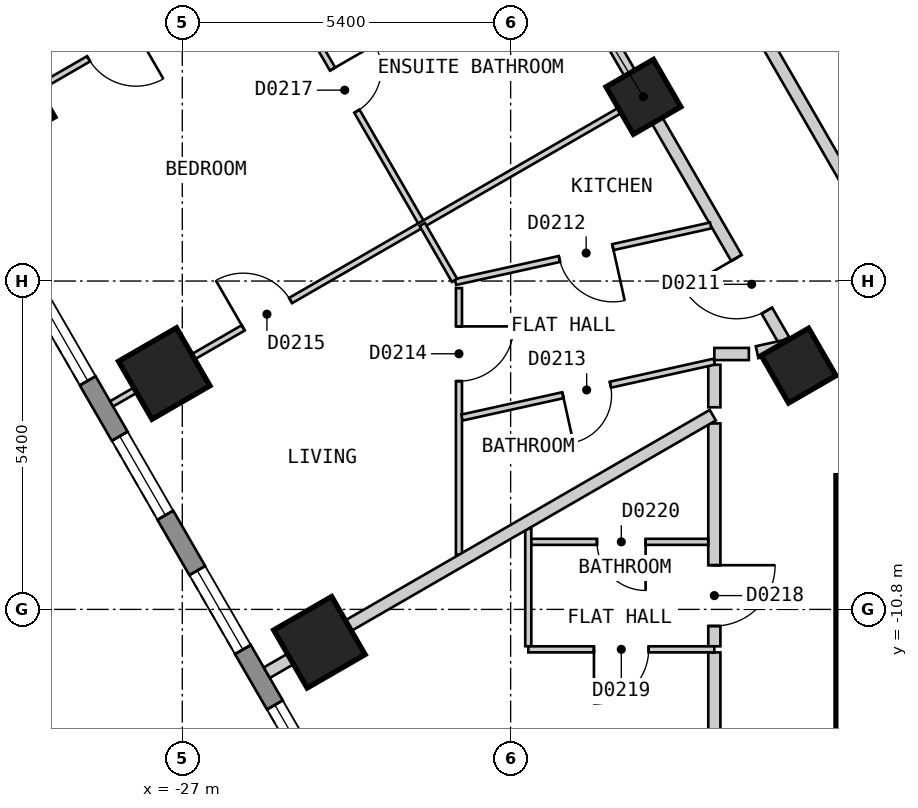
"""IFC4 building model, lengths in metres.
Left out: names, types, materials, properties, quantities, classifications, styles, units other than length and angle.
Written with IfcOpenShell. Run it as: python <this file> out.ifc"""

import sys

from ifc_helpers import new_model, si_unit, direction, frame, frame_2d, origin, origin_2d, place, context, subcontext, project, spatial, polyline, rectangle, outline, extrude, element, fill, save


model = new_model("IFC4")
c1 = context("Model", 3, precision=1e-05, world=origin(), true_north=direction((0.0, 1.0)))
c2 = subcontext(c1, "Body", "Model", "MODEL_VIEW")
j1 = project(units=[si_unit("LENGTHUNIT", "METRE"), si_unit("PLANEANGLEUNIT", "RADIAN")], contexts=[c1])
p1 = place(None, origin())
s1 = spatial("IfcSite", under=j1, at=p1, CompositionType="ELEMENT")
p2 = place(p1, origin())
s2 = spatial("IfcBuilding", under=s1, at=p2, CompositionType="ELEMENT")
p3 = place(p2, frame((0.0, 0.0, 47.4)))
s3 = spatial("IfcBuildingStorey", under=s2, at=p3, CompositionType="ELEMENT", Elevation=47.4)
for number, where, z_axis, x_axis in (
    (1, (-29.848, -2.5, 0.0), (0.0, 0.0, 1.0), (0.5, -0.866, 0.0)),
    (2, (-27.297, -6.921, 0.0), (0.0, 0.0, 1.0), (0.5, -0.866, 0.0)),
    (3, (-24.745, -11.341, 0.0), (0.0, 0.0, 1.0), (0.5, -0.866, 0.0)),
):
    element("IfcColumn", number, at=place(p3, frame(where, z_axis=z_axis, x_axis=x_axis)), inside=s3, PredefinedType="COLUMN", context=c2, shape_type="SweptSolid", body=[
        extrude(rectangle(XDim=1.1, YDim=1.1, at=origin_2d()), origin(), (0.0, 0.0, 1.0), 3.0),
    ])
for number, where, z_axis, x_axis in (
    (4, (-19.416, -2.371, 0.0), (0.0, 0.0, 1.0), (0.5, -0.866, 0.0)),
    (5, (-16.864, -6.791, 0.0), (0.0, 0.0, 1.0), (0.5, -0.866, 0.0)),
):
    element("IfcColumn", number, at=place(p3, frame(where, z_axis=z_axis, x_axis=x_axis)), inside=s3, PredefinedType="COLUMN", context=c2, shape_type="SweptSolid", body=[
        extrude(rectangle(XDim=0.9, YDim=0.9, at=origin_2d()), origin(), (0.0, 0.0, 1.0), 3.0),
    ])
p4 = place(p3, frame((-31.22, -2.425, 0.0), z_axis=(0.0, 0.0, 1.0), x_axis=(0.500001938803, -0.866024284413, 0.0)))
e6 = element("IfcWall", 6, at=p4, inside=s3, PredefinedType="SOLIDWALL", context=c2, shape_type="SweptSolid", body=[
    extrude(outline(polyline([(0.0, -0.15), (27.02, -0.15), (26.94, 0.15), (0.08, 0.15), (0.0, -0.15)])), origin(), (0.0, 0.0, 1.0), 2.7),
])
p5 = place(p4, frame((1.277, 0.0, 0.15)))
e7 = element("IfcOpeningElement", 7, at=p5, cuts=e6, PredefinedType="OPENING", context=c2, shape_type="SweptSolid", body=[
    extrude(rectangle(XDim=1.5, YDim=2.1, at=frame_2d((0.75, 1.05))), frame((0.0, 0.16, 0.0), z_axis=(0.0, -1.0, 0.0), x_axis=(1.0, 0.0, 0.0)), (0.0, 0.0, 1.0), 0.32),
])
p6 = place(p4, frame((3.829, 0.0, 0.15)))
e8 = element("IfcOpeningElement", 8, at=p6, cuts=e6, PredefinedType="OPENING", context=c2, shape_type="SweptSolid", body=[
    extrude(rectangle(XDim=1.5, YDim=2.1, at=frame_2d((0.75, 1.05))), frame((0.0, 0.16, 0.0), z_axis=(0.0, -1.0, 0.0), x_axis=(1.0, 0.0, 0.0)), (0.0, 0.0, 1.0), 0.32),
])
p7 = place(p4, frame((6.382, 0.0, 0.15)))
e9 = element("IfcOpeningElement", 9, at=p7, cuts=e6, PredefinedType="OPENING", context=c2, shape_type="SweptSolid", body=[
    extrude(rectangle(XDim=1.5, YDim=2.1, at=frame_2d((0.75, 1.05))), frame((0.0, 0.16, 0.0), z_axis=(0.0, -1.0, 0.0), x_axis=(1.0, 0.0, 0.0)), (0.0, 0.0, 1.0), 0.32),
])
p8 = place(p4, frame((8.933, 0.0, 0.15)))
e10 = element("IfcOpeningElement", 10, at=p8, cuts=e6, PredefinedType="OPENING", context=c2, shape_type="SweptSolid", body=[
    extrude(rectangle(XDim=1.5, YDim=2.1, at=frame_2d((0.75, 1.05))), frame((0.0, 0.16, 0.0), z_axis=(0.0, -1.0, 0.0), x_axis=(1.0, 0.0, 0.0)), (0.0, 0.0, 1.0), 0.32),
])
p9 = place(p4, frame((11.485, 0.0, 0.15)))
e11 = element("IfcOpeningElement", 11, at=p9, cuts=e6, PredefinedType="OPENING", context=c2, shape_type="SweptSolid", body=[
    extrude(rectangle(XDim=1.5, YDim=2.1, at=frame_2d((0.75, 1.05))), frame((0.0, 0.16, 0.0), z_axis=(0.0, -1.0, 0.0), x_axis=(1.0, 0.0, 0.0)), (0.0, 0.0, 1.0), 0.32),
])
p10 = place(p4, frame((14.037, 0.0, 0.15)))
e12 = element("IfcOpeningElement", 12, at=p10, cuts=e6, PredefinedType="OPENING", context=c2, shape_type="SweptSolid", body=[
    extrude(rectangle(XDim=1.5, YDim=2.1, at=frame_2d((0.75, 1.05))), frame((0.0, 0.16, 0.0), z_axis=(0.0, -1.0, 0.0), x_axis=(1.0, 0.0, 0.0)), (0.0, 0.0, 1.0), 0.32),
])
p11 = place(p4, frame((16.589, 0.0, 0.15)))
e13 = element("IfcOpeningElement", 13, at=p11, cuts=e6, PredefinedType="OPENING", context=c2, shape_type="SweptSolid", body=[
    extrude(rectangle(XDim=1.5, YDim=2.1, at=frame_2d((0.75, 1.05))), frame((0.0, 0.16, 0.0), z_axis=(0.0, -1.0, 0.0), x_axis=(1.0, 0.0, 0.0)), (0.0, 0.0, 1.0), 0.32),
])
p12 = place(p4, frame((19.141, 0.0, 0.15)))
e14 = element("IfcOpeningElement", 14, at=p12, cuts=e6, PredefinedType="OPENING", context=c2, shape_type="SweptSolid", body=[
    extrude(rectangle(XDim=1.5, YDim=2.1, at=frame_2d((0.75, 1.05))), frame((0.0, 0.16, 0.0), z_axis=(0.0, -1.0, 0.0), x_axis=(1.0, 0.0, 0.0)), (0.0, 0.0, 1.0), 0.32),
])
p13 = place(p4, frame((21.693, 0.0, 0.15)))
e15 = element("IfcOpeningElement", 15, at=p13, cuts=e6, PredefinedType="OPENING", context=c2, shape_type="SweptSolid", body=[
    extrude(rectangle(XDim=1.5, YDim=2.1, at=frame_2d((0.75, 1.05))), frame((0.0, 0.16, 0.0), z_axis=(0.0, -1.0, 0.0), x_axis=(1.0, 0.0, 0.0)), (0.0, 0.0, 1.0), 0.32),
])
p14 = place(p4, frame((24.244, 0.0, 0.15)))
e16 = element("IfcOpeningElement", 16, at=p14, cuts=e6, PredefinedType="OPENING", context=c2, shape_type="SweptSolid", body=[
    extrude(rectangle(XDim=1.5, YDim=2.1, at=frame_2d((0.75, 1.05))), frame((0.0, 0.16, 0.0), z_axis=(0.0, -1.0, 0.0), x_axis=(1.0, 0.0, 0.0)), (0.0, 0.0, 1.0), 0.32),
])
p15 = place(p3, frame((-18.186, -0.101, 0.0), z_axis=(0.0, 0.0, 1.0), x_axis=(0.499997591167, -0.86602679452, 0.0)))
e17 = element("IfcWall", 17, at=p15, inside=s3, PredefinedType="PARTITIONING", context=c2, shape_type="SweptSolid", body=[
    extrude(rectangle(XDim=5.172, YDim=0.2, at=frame_2d((2.586, 0.0))), origin(), (0.0, 0.0, 1.0), 2.7),
])
p16 = place(p3, frame((-20.727, -0.101, 0.0), z_axis=(0.0, 0.0, 1.0), x_axis=(0.500070814966, -0.865984514884, 0.0)))
e18 = element("IfcWall", 18, at=p16, inside=s3, PredefinedType="PARTITIONING", context=c2, shape_type="SweptSolid", body=[
    extrude(rectangle(XDim=7.239, YDim=0.2, at=frame_2d((3.62, 0.0))), origin(), (0.0, 0.0, 1.0), 2.7),
])
p17 = place(p16, frame((5.681, 0.0, 0.0)))
e19 = element("IfcOpeningElement", 19, at=p17, cuts=e18, PredefinedType="OPENING", context=c2, shape_type="SweptSolid", body=[
    extrude(rectangle(XDim=1.0, YDim=2.1, at=frame_2d((0.5, 1.05))), frame((0.0, 0.11, 0.0), z_axis=(0.0, -1.0, 0.0), x_axis=(1.0, 0.0, 0.0)), (0.0, 0.0, 1.0), 0.22),
])
p18 = place(p3, frame((-18.25, -11.507, 0.0), z_axis=(0.0, 0.0, 1.0), x_axis=(0.0, -1.0, 0.0)))
e20 = element("IfcWall", 20, at=p18, inside=s3, PredefinedType="PARTITIONING", context=c2, shape_type="SweptSolid", body=[
    extrude(rectangle(XDim=4.792, YDim=0.2, at=frame_2d((2.396, 0.0))), origin(), (0.0, 0.0, 1.0), 2.7),
])
p19 = place(p3, frame((-18.25, -6.6, 0.0), z_axis=(0.0, 0.0, 1.0), x_axis=(1.0, 0.0, 0.0)))
e21 = element("IfcWall", 21, at=p19, inside=s3, PredefinedType="PARTITIONING", context=c2, shape_type="SweptSolid", body=[
    extrude(rectangle(XDim=0.568, YDim=0.2, at=frame_2d((0.284, 0.0))), origin(), (0.0, 0.0, 1.0), 2.7),
])
p20 = place(p3, frame((-18.25, -11.407, 0.0), z_axis=(0.0, 0.0, 1.0), x_axis=(0.0, 1.0, 0.0)))
e22 = element("IfcWall", 22, at=p20, inside=s3, PredefinedType="PARTITIONING", context=c2, shape_type="SweptSolid", body=[
    extrude(rectangle(XDim=3.665, YDim=0.2, at=frame_2d((1.833, 0.0))), origin(), (0.0, 0.0, 1.0), 2.7),
])
p21 = place(p20, frame((0.334, 0.0, 0.0)))
e23 = element("IfcOpeningElement", 23, at=p21, cuts=e22, PredefinedType="OPENING", context=c2, shape_type="SweptSolid", body=[
    extrude(rectangle(XDim=1.0, YDim=2.1, at=frame_2d((0.5, 1.05))), frame((0.0, 0.11, 0.0), z_axis=(0.0, -1.0, 0.0), x_axis=(1.0, 0.0, 0.0)), (0.0, 0.0, 1.0), 0.22),
])
p22 = place(p3, frame((-18.25, -7.476, 0.0), z_axis=(0.0, 0.0, 1.0), x_axis=(0.0, 1.0, 0.0)))
e24 = element("IfcWall", 24, at=p22, inside=s3, PredefinedType="PARTITIONING", context=c2, shape_type="SweptSolid", body=[
    extrude(rectangle(XDim=0.699, YDim=0.2, at=frame_2d((0.35, 0.0))), origin(), (0.0, 0.0, 1.0), 2.7),
])
p23 = place(p3, frame((-25.58, -0.094, 0.0), z_axis=(0.0, 0.0, 1.0), x_axis=(0.500093258202, -0.865971554441, 0.0)))
e25 = element("IfcWall", 25, at=p23, inside=s3, PredefinedType="PARTITIONING", context=c2, shape_type="SweptSolid", body=[
    extrude(rectangle(XDim=5.053, YDim=0.1, at=frame_2d((2.527, 0.0))), origin(), (0.0, 0.0, 1.0), 2.7),
])
p24 = place(p23, frame((2.102, 0.0, 0.0)))
e26 = element("IfcOpeningElement", 26, at=p24, cuts=e25, PredefinedType="OPENING", context=c2, shape_type="SweptSolid", body=[
    extrude(rectangle(XDim=0.8, YDim=2.1, at=frame_2d((0.4, 1.05))), frame((0.0, 0.06, 0.0), z_axis=(0.0, -1.0, 0.0), x_axis=(1.0, 0.0, 0.0)), (0.0, 0.0, 1.0), 0.12),
])
p25 = place(p3, frame((-21.31, -9.474, 0.0), z_axis=(0.0, 0.0, 1.0), x_axis=(0.0, -1.0, 0.0)))
e27 = element("IfcWall", 27, at=p25, inside=s3, PredefinedType="PARTITIONING", context=c2, shape_type="SweptSolid", body=[
    extrude(rectangle(XDim=1.932, YDim=0.1, at=frame_2d((0.966, 0.0))), origin(), (0.0, 0.0, 1.0), 2.7),
])
p26 = place(p3, frame((-21.26, -9.689, 0.0), z_axis=(0.0, 0.0, 1.0), x_axis=(1.0, 0.0, 0.0)))
e28 = element("IfcWall", 28, at=p26, inside=s3, PredefinedType="PARTITIONING", context=c2, shape_type="SweptSolid", body=[
    extrude(rectangle(XDim=2.91, YDim=0.1, at=frame_2d((1.455, 0.0))), origin(), (0.0, 0.0, 1.0), 2.7),
])
p27 = place(p26, frame((1.08, 0.0, 0.0)))
e29 = element("IfcOpeningElement", 29, at=p27, cuts=e28, PredefinedType="OPENING", context=c2, shape_type="SweptSolid", body=[
    extrude(rectangle(XDim=0.8, YDim=2.1, at=frame_2d((0.4, 1.05))), frame((0.0, 0.06, 0.0), z_axis=(0.0, -1.0, 0.0), x_axis=(1.0, 0.0, 0.0)), (0.0, 0.0, 1.0), 0.12),
])
p28 = place(p3, frame((-21.309, -11.457, 0.0), z_axis=(0.0, 0.0, 1.0), x_axis=(1.0, 0.0, 0.0)))
e30 = element("IfcWall", 30, at=p28, inside=s3, PredefinedType="PARTITIONING", context=c2, shape_type="SweptSolid", body=[
    extrude(rectangle(XDim=3.059, YDim=0.1, at=frame_2d((1.53, 0.0))), origin(), (0.0, 0.0, 1.0), 2.7),
])
p29 = place(p28, frame((1.079, 0.0, 0.0)))
e31 = element("IfcOpeningElement", 31, at=p29, cuts=e30, PredefinedType="OPENING", context=c2, shape_type="SweptSolid", body=[
    extrude(rectangle(XDim=0.9, YDim=2.1, at=frame_2d((0.45, 1.05))), frame((0.0, 0.06, 0.0), z_axis=(0.0, -1.0, 0.0), x_axis=(1.0, 0.0, 0.0)), (0.0, 0.0, 1.0), 0.12),
])
p30 = place(p3, frame((-22.45, -9.901, 0.0), z_axis=(0.0, 0.0, 1.0), x_axis=(0.0, 1.0, 0.0)))
e32 = element("IfcWall", 32, at=p30, inside=s3, PredefinedType="PARTITIONING", context=c2, shape_type="SweptSolid", body=[
    extrude(rectangle(XDim=4.385, YDim=0.1, at=frame_2d((2.192, 0.0))), origin(), (0.0, 0.0, 1.0), 2.7),
])
p31 = place(p30, frame((2.855, 0.0, 0.0)))
e33 = element("IfcOpeningElement", 33, at=p31, cuts=e32, PredefinedType="OPENING", context=c2, shape_type="SweptSolid", body=[
    extrude(rectangle(XDim=0.9, YDim=2.1, at=frame_2d((0.45, 1.05))), frame((0.0, 0.06, 0.0), z_axis=(0.0, -1.0, 0.0), x_axis=(1.0, 0.0, 0.0)), (0.0, 0.0, 1.0), 0.12),
])
p32 = place(p3, frame((-22.508, -5.416, 0.0), z_axis=(0.0, 0.0, 1.0), x_axis=(0.976332464286, 0.216275100696, 0.0)))
e34 = element("IfcWall", 34, at=p32, inside=s3, PredefinedType="PARTITIONING", context=c2, shape_type="SweptSolid", body=[
    extrude(rectangle(XDim=4.3, YDim=0.1, at=frame_2d((2.15, 0.0))), origin(), (0.0, 0.0, 1.0), 2.7),
])
p33 = place(p32, frame((1.752, 0.0, 0.0)))
e35 = element("IfcOpeningElement", 35, at=p33, cuts=e34, PredefinedType="OPENING", context=c2, shape_type="SweptSolid", body=[
    extrude(rectangle(XDim=0.9, YDim=2.1, at=frame_2d((0.45, 1.05))), frame((0.0, 0.06, 0.0), z_axis=(0.0, -1.0, 0.0), x_axis=(1.0, 0.0, 0.0)), (0.0, 0.0, 1.0), 0.12),
])
p34 = place(p3, frame((-22.4, -7.645, 0.0), z_axis=(0.0, 0.0, 1.0), x_axis=(0.97634896822, 0.216200583385, 0.0)))
e36 = element("IfcWall", 36, at=p34, inside=s3, PredefinedType="PARTITIONING", context=c2, shape_type="SweptSolid", body=[
    extrude(rectangle(XDim=4.25, YDim=0.1, at=frame_2d((2.125, 0.0))), origin(), (0.0, 0.0, 1.0), 2.7),
])
p35 = place(p34, frame((1.7, 0.0, 0.0)))
e37 = element("IfcOpeningElement", 37, at=p35, cuts=e36, PredefinedType="OPENING", context=c2, shape_type="SweptSolid", body=[
    extrude(rectangle(XDim=0.8, YDim=2.1, at=frame_2d((0.4, 1.05))), frame((0.0, 0.06, 0.0), z_axis=(0.0, -1.0, 0.0), x_axis=(1.0, 0.0, 0.0)), (0.0, 0.0, 1.0), 0.12),
])
p36 = place(p3, frame((-28.163, -7.42, 0.0), z_axis=(0.0, 0.0, 1.0), x_axis=(0.866065245018, 0.499930986609, 0.0)))
e38 = element("IfcWall", 38, at=p36, inside=s3, PredefinedType="PARTITIONING", context=c2, shape_type="SweptSolid", body=[
    extrude(rectangle(XDim=10.0, YDim=0.1, at=frame_2d((5.0, 0.0))), origin(), (0.0, 0.0, 1.0), 2.7),
])
p37 = place(p36, frame((2.5, 0.0, 0.0)))
e39 = element("IfcOpeningElement", 39, at=p37, cuts=e38, PredefinedType="OPENING", context=c2, shape_type="SweptSolid", body=[
    extrude(rectangle(XDim=0.9, YDim=2.1, at=frame_2d((0.45, 1.05))), frame((0.0, 0.06, 0.0), z_axis=(0.0, -1.0, 0.0), x_axis=(1.0, 0.0, 0.0)), (0.0, 0.0, 1.0), 0.12),
])
p38 = place(p3, frame((-30.715, -3.0, 0.0), z_axis=(0.0, 0.0, 1.0), x_axis=(0.866113484451, 0.499847408768, 0.0)))
e40 = element("IfcWall", 40, at=p38, inside=s3, PredefinedType="PARTITIONING", context=c2, shape_type="SweptSolid", body=[
    extrude(rectangle(XDim=5.92, YDim=0.1, at=frame_2d((2.96, 0.0))), origin(), (0.0, 0.0, 1.0), 2.7),
])
p39 = place(p38, frame((2.51, 0.0, 0.0)))
e41 = element("IfcOpeningElement", 41, at=p39, cuts=e40, PredefinedType="OPENING", context=c2, shape_type="SweptSolid", body=[
    extrude(rectangle(XDim=0.9, YDim=2.1, at=frame_2d((0.45, 1.05))), frame((0.0, 0.06, 0.0), z_axis=(0.0, -1.0, 0.0), x_axis=(1.0, 0.0, 0.0)), (0.0, 0.0, 1.0), 0.12),
])
p40 = place(p3, frame((-17.547, -6.57, 0.0), z_axis=(0.0, 0.0, 1.0), x_axis=(0.97647747569, 0.215619432033, 0.0)))
e42 = element("IfcWall", 42, at=p40, inside=s3, PredefinedType="PARTITIONING", context=c2, shape_type="SweptSolid", body=[
    extrude(rectangle(XDim=0.473, YDim=0.2, at=frame_2d((0.237, 0.0))), origin(), (0.0, 0.0, 1.0), 2.7),
])
p41 = place(p3, frame((-25.61, -11.841, 0.0), z_axis=(0.0, 0.0, 1.0), x_axis=(0.866019023803, 0.500011050288, 0.0)))
e43 = element("IfcWall", 43, at=p41, inside=s3, PredefinedType="PARTITIONING", context=c2, shape_type="SweptSolid", body=[
    extrude(rectangle(XDim=8.47, YDim=0.2, at=frame_2d((4.235, 0.0))), origin(), (0.0, 0.0, 1.0), 2.7),
])
p42 = place(p3, frame((-23.053, -4.47, 0.0), z_axis=(0.0, 0.0, 1.0), x_axis=(0.499629475903, -0.866239220313, 0.0)))
e44 = element("IfcWall", 44, at=p42, inside=s3, PredefinedType="PARTITIONING", context=c2, shape_type="SweptSolid", body=[
    extrude(rectangle(XDim=1.061, YDim=0.1, at=frame_2d((0.53, 0.0))), origin(), (0.0, 0.0, 1.0), 2.7),
])
p43 = place(p3, frame((-16.15, -14.4, 0.0), z_axis=(0.0, 0.0, 1.0), x_axis=(0.0, 1.0, 0.0)))
e45 = element("IfcWall", 45, at=p43, inside=s3, PredefinedType="SOLIDWALL", context=c2, shape_type="SweptSolid", body=[
    extrude(rectangle(XDim=5.8, YDim=0.2, at=frame_2d((2.9, 0.0))), origin(), (0.0, 0.0, 1.0), 2.7),
])
p44 = place(p6, origin())
e46 = element("IfcWindow", 46, at=p44, inside=s3, PartitioningType="SINGLE_PANEL", PredefinedType="WINDOW", context=c2, shape_type="SweptSolid", body=[
    extrude(rectangle(XDim=1.5, YDim=2.1, at=frame_2d((0.75, 1.05))), frame((0.0, 0.03, 0.0), z_axis=(0.0, -1.0, 0.0), x_axis=(1.0, 0.0, 0.0)), (0.0, 0.0, 1.0), 0.06),
])
fill(e8, e46)
p45 = place(p7, origin())
e47 = element("IfcWindow", 47, at=p45, inside=s3, PartitioningType="SINGLE_PANEL", PredefinedType="WINDOW", context=c2, shape_type="SweptSolid", body=[
    extrude(rectangle(XDim=1.5, YDim=2.1, at=frame_2d((0.75, 1.05))), frame((0.0, 0.03, 0.0), z_axis=(0.0, -1.0, 0.0), x_axis=(1.0, 0.0, 0.0)), (0.0, 0.0, 1.0), 0.06),
])
fill(e9, e47)
p46 = place(p8, origin())
e48 = element("IfcWindow", 48, at=p46, inside=s3, PartitioningType="SINGLE_PANEL", PredefinedType="WINDOW", context=c2, shape_type="SweptSolid", body=[
    extrude(rectangle(XDim=1.5, YDim=2.1, at=frame_2d((0.75, 1.05))), frame((0.0, 0.03, 0.0), z_axis=(0.0, -1.0, 0.0), x_axis=(1.0, 0.0, 0.0)), (0.0, 0.0, 1.0), 0.06),
])
fill(e10, e48)
p47 = place(p9, origin())
e49 = element("IfcWindow", 49, at=p47, inside=s3, PartitioningType="SINGLE_PANEL", PredefinedType="WINDOW", context=c2, shape_type="SweptSolid", body=[
    extrude(rectangle(XDim=1.5, YDim=2.1, at=frame_2d((0.75, 1.05))), frame((0.0, 0.03, 0.0), z_axis=(0.0, -1.0, 0.0), x_axis=(1.0, 0.0, 0.0)), (0.0, 0.0, 1.0), 0.06),
])
fill(e11, e49)
p48 = place(p17, origin())
e50 = element("IfcDoor", 50, at=p48, inside=s3, OperationType="SINGLE_SWING_LEFT", PredefinedType="DOOR", context=c2, shape_type="SweptSolid", body=[
    extrude(rectangle(XDim=1.0, YDim=2.1, at=frame_2d((0.5, 1.05))), frame((0.0, 0.025, 0.0), z_axis=(0.0, -1.0, 0.0), x_axis=(1.0, 0.0, 0.0)), (0.0, 0.0, 1.0), 0.05),
])
fill(e19, e50)
p49 = place(p33, origin())
e51 = element("IfcDoor", 51, at=p49, inside=s3, OperationType="SINGLE_SWING_RIGHT", PredefinedType="DOOR", context=c2, shape_type="SweptSolid", body=[
    extrude(rectangle(XDim=0.9, YDim=2.1, at=frame_2d((0.45, 1.05))), frame((0.0, 0.025, 0.0), z_axis=(0.0, -1.0, 0.0), x_axis=(1.0, 0.0, 0.0)), (0.0, 0.0, 1.0), 0.05),
])
fill(e35, e51)
p50 = place(p35, origin())
e52 = element("IfcDoor", 52, at=p50, inside=s3, OperationType="SINGLE_SWING_LEFT", PredefinedType="DOOR", context=c2, shape_type="SweptSolid", body=[
    extrude(rectangle(XDim=0.8, YDim=2.1, at=frame_2d((0.4, 1.05))), frame((0.0, 0.025, 0.0), z_axis=(0.0, -1.0, 0.0), x_axis=(1.0, 0.0, 0.0)), (0.0, 0.0, 1.0), 0.05),
])
fill(e37, e52)
p51 = place(p31, origin())
e53 = element("IfcDoor", 53, at=p51, inside=s3, OperationType="SINGLE_SWING_RIGHT", PredefinedType="DOOR", context=c2, shape_type="SweptSolid", body=[
    extrude(rectangle(XDim=0.9, YDim=2.1, at=frame_2d((0.45, 1.05))), frame((0.0, 0.025, 0.0), z_axis=(0.0, -1.0, 0.0), x_axis=(1.0, 0.0, 0.0)), (0.0, 0.0, 1.0), 0.05),
])
fill(e33, e53)
p52 = place(p37, origin())
e54 = element("IfcDoor", 54, at=p52, inside=s3, OperationType="SINGLE_SWING_LEFT", PredefinedType="DOOR", context=c2, shape_type="SweptSolid", body=[
    extrude(rectangle(XDim=0.9, YDim=2.1, at=frame_2d((0.45, 1.05))), frame((0.0, 0.025, 0.0), z_axis=(0.0, -1.0, 0.0), x_axis=(1.0, 0.0, 0.0)), (0.0, 0.0, 1.0), 0.05),
])
fill(e39, e54)
p53 = place(p39, origin())
e55 = element("IfcDoor", 55, at=p53, inside=s3, OperationType="SINGLE_SWING_RIGHT", PredefinedType="DOOR", context=c2, shape_type="SweptSolid", body=[
    extrude(rectangle(XDim=0.9, YDim=2.1, at=frame_2d((0.45, 1.05))), frame((0.0, 0.025, 0.0), z_axis=(0.0, -1.0, 0.0), x_axis=(1.0, 0.0, 0.0)), (0.0, 0.0, 1.0), 0.05),
])
fill(e41, e55)
p54 = place(p24, origin())
e56 = element("IfcDoor", 56, at=p54, inside=s3, OperationType="SINGLE_SWING_LEFT", PredefinedType="DOOR", context=c2, shape_type="SweptSolid", body=[
    extrude(rectangle(XDim=0.8, YDim=2.1, at=frame_2d((0.4, 1.05))), frame((0.0, 0.025, 0.0), z_axis=(0.0, -1.0, 0.0), x_axis=(1.0, 0.0, 0.0)), (0.0, 0.0, 1.0), 0.05),
])
fill(e26, e56)
p55 = place(p21, origin())
e57 = element("IfcDoor", 57, at=p55, inside=s3, OperationType="SINGLE_SWING_RIGHT", PredefinedType="DOOR", context=c2, shape_type="SweptSolid", body=[
    extrude(rectangle(XDim=1.0, YDim=2.1, at=frame_2d((0.5, 1.05))), frame((0.0, 0.025, 0.0), z_axis=(0.0, -1.0, 0.0), x_axis=(1.0, 0.0, 0.0)), (0.0, 0.0, 1.0), 0.05),
])
fill(e23, e57)
p56 = place(p29, origin())
e58 = element("IfcDoor", 58, at=p56, inside=s3, OperationType="SINGLE_SWING_LEFT", PredefinedType="DOOR", context=c2, shape_type="SweptSolid", body=[
    extrude(rectangle(XDim=0.9, YDim=2.1, at=frame_2d((0.45, 1.05))), frame((0.0, 0.025, 0.0), z_axis=(0.0, -1.0, 0.0), x_axis=(1.0, 0.0, 0.0)), (0.0, 0.0, 1.0), 0.05),
])
fill(e31, e58)
p57 = place(p27, origin())
e59 = element("IfcDoor", 59, at=p57, inside=s3, OperationType="SINGLE_SWING_RIGHT", PredefinedType="DOOR", context=c2, shape_type="SweptSolid", body=[
    extrude(rectangle(XDim=0.8, YDim=2.1, at=frame_2d((0.4, 1.05))), frame((0.0, 0.025, 0.0), z_axis=(0.0, -1.0, 0.0), x_axis=(1.0, 0.0, 0.0)), (0.0, 0.0, 1.0), 0.05),
])
fill(e29, e59)
save(model, sys.argv[1])
